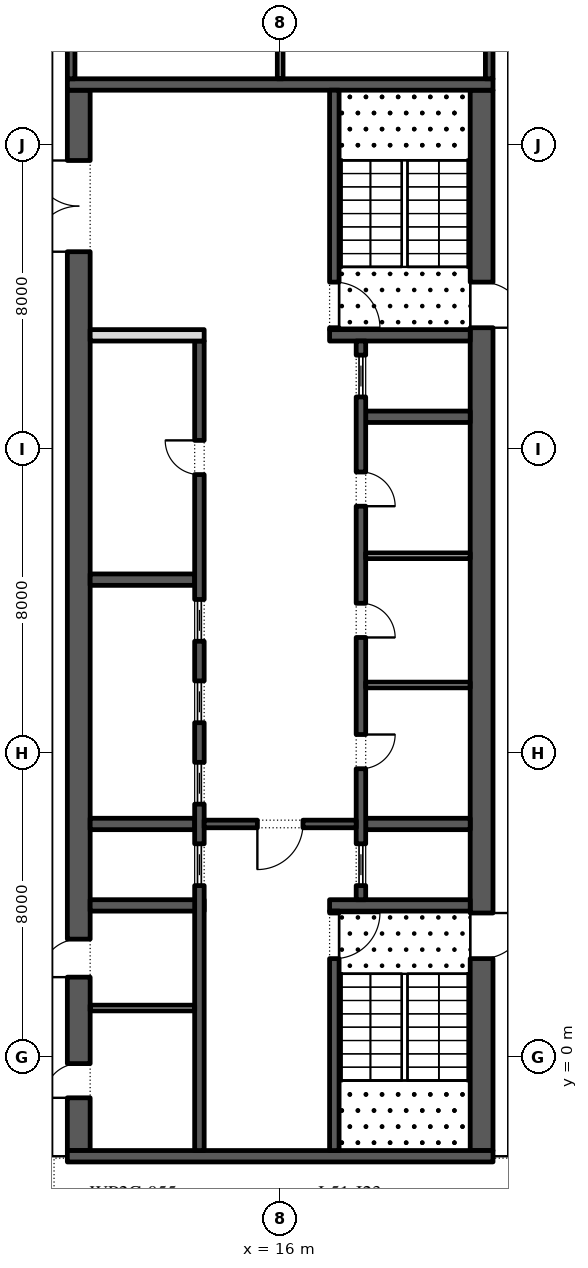
"""IFC4 building model, lengths in metres.
Left out: names, types, materials, properties, quantities, classifications, styles, units other than length and angle.
Written with IfcOpenShell. Run it as: python <this file> out.ifc"""

import sys

from ifc_helpers import new_model, si_unit, direction, frame, frame_2d, origin, place, context, subcontext, project, spatial, rectangle, extrude, element, fill, save


model = new_model("IFC4")
c1 = context("Model", 3, precision=1e-05, world=origin(), true_north=direction((0.0, 1.0)))
c2 = subcontext(c1, "Body", "Model", "MODEL_VIEW")
j1 = project(units=[si_unit("LENGTHUNIT", "METRE"), si_unit("PLANEANGLEUNIT", "RADIAN")], contexts=[c1])
p1 = place(None, origin())
s1 = spatial("IfcSite", under=j1, at=p1, CompositionType="ELEMENT")
p2 = place(p1, origin())
s2 = spatial("IfcBuilding", under=s1, at=p2, CompositionType="ELEMENT")
p3 = place(p2, frame((0.0, 0.0, 237.0)))
s3 = spatial("IfcBuildingStorey", under=s2, at=p3, CompositionType="ELEMENT", Elevation=237.0)
p4 = place(p3, frame((21.3, -2.45, 0.0), z_axis=(0.0, 0.0, 1.0), x_axis=(0.0, 1.0, 0.0)))
e1 = element("IfcWall", 1, at=p4, inside=s3, PredefinedType="SHEAR", context=c2, shape_type="SweptSolid", body=[
    extrude(rectangle(XDim=27.9, YDim=0.6, at=frame_2d((13.95, 0.0))), origin(), (0.0, 0.0, 1.0), 5.8),
])
p5 = place(p4, frame((5.05, 0.0, 0.0)))
e2 = element("IfcOpeningElement", 2, at=p5, cuts=e1, PredefinedType="OPENING", context=c2, shape_type="SweptSolid", body=[
    extrude(rectangle(XDim=1.2, YDim=2.1, at=frame_2d((0.6, 1.05))), frame((0.0, 0.31, 0.0), z_axis=(0.0, -1.0, 0.0), x_axis=(1.0, 0.0, 0.0)), (0.0, 0.0, 1.0), 0.62),
])
p6 = place(p4, frame((21.65, 0.0, 0.0)))
e3 = element("IfcOpeningElement", 3, at=p6, cuts=e1, PredefinedType="OPENING", context=c2, shape_type="SweptSolid", body=[
    extrude(rectangle(XDim=1.2, YDim=2.1, at=frame_2d((0.6, 1.05))), frame((0.0, 0.31, 0.0), z_axis=(0.0, -1.0, 0.0), x_axis=(1.0, 0.0, 0.0)), (0.0, 0.0, 1.0), 0.62),
])
p7 = place(p3, frame((10.7, -2.45, 0.0), z_axis=(0.0, 0.0, 1.0), x_axis=(0.0, 1.0, 0.0)))
e4 = element("IfcWall", 4, at=p7, inside=s3, PredefinedType="SHEAR", context=c2, shape_type="SweptSolid", body=[
    extrude(rectangle(XDim=27.9, YDim=0.6, at=frame_2d((13.95, 0.0))), origin(), (0.0, 0.0, 1.0), 5.8),
])
p8 = place(p7, frame((23.65, 0.0, 0.0)))
e5 = element("IfcOpeningElement", 5, at=p8, cuts=e4, PredefinedType="OPENING", context=c2, shape_type="SweptSolid", body=[
    extrude(rectangle(XDim=2.4, YDim=2.1, at=frame_2d((1.2, 1.05))), frame((0.0, 0.31, 0.0), z_axis=(0.0, -1.0, 0.0), x_axis=(1.0, 0.0, 0.0)), (0.0, 0.0, 1.0), 0.62),
])
p9 = place(p7, frame((1.387, 0.0, 0.0)))
e6 = element("IfcOpeningElement", 6, at=p9, cuts=e4, PredefinedType="OPENING", context=c2, shape_type="SweptSolid", body=[
    extrude(rectangle(XDim=0.9, YDim=2.1, at=frame_2d((0.45, 1.05))), frame((0.0, 0.31, 0.0), z_axis=(0.0, -1.0, 0.0), x_axis=(1.0, 0.0, 0.0)), (0.0, 0.0, 1.0), 0.62),
])
p10 = place(p7, frame((4.562, 0.0, 0.0)))
e7 = element("IfcOpeningElement", 7, at=p10, cuts=e4, PredefinedType="OPENING", context=c2, shape_type="SweptSolid", body=[
    extrude(rectangle(XDim=1.0, YDim=2.1, at=frame_2d((0.5, 1.05))), frame((0.0, 0.31, 0.0), z_axis=(0.0, -1.0, 0.0), x_axis=(1.0, 0.0, 0.0)), (0.0, 0.0, 1.0), 0.62),
])
for number, where, z_axis, x_axis in (
    (8, (10.4, -2.6, 0.0), (0.0, 0.0, 1.0), (1.0, 0.0, 0.0)),
    (9, (10.4, 25.6, 0.0), (0.0, 0.0, 1.0), (1.0, 0.0, 0.0)),
):
    element("IfcWall", number, at=place(p3, frame(where, z_axis=z_axis, x_axis=x_axis)), inside=s3, PredefinedType="SHEAR", context=c2, shape_type="SweptSolid", body=[
        extrude(rectangle(XDim=11.2, YDim=0.3, at=frame_2d((5.6, 0.0))), origin(), (0.0, 0.0, 1.0), 5.8),
    ])
p11 = place(p3, frame((17.3, 4.0, 0.0), z_axis=(0.0, 0.0, 1.0), x_axis=(1.0, 0.0, 0.0)))
e10 = element("IfcWall", 10, at=p11, inside=s3, PredefinedType="SHEAR", context=c2, shape_type="SweptSolid", body=[
    extrude(rectangle(XDim=3.7, YDim=0.3, at=frame_2d((1.85, 0.0))), origin(), (0.0, 0.0, 1.0), 5.8),
])
p12 = place(p3, frame((17.425, -2.45, 0.0), z_axis=(0.0, 0.0, 1.0), x_axis=(0.0, 1.0, 0.0)))
e11 = element("IfcWall", 11, at=p12, inside=s3, PredefinedType="SHEAR", context=c2, shape_type="SweptSolid", body=[
    extrude(rectangle(XDim=6.3, YDim=0.25, at=frame_2d((3.15, 0.0))), origin(), (0.0, 0.0, 1.0), 5.8),
])
p13 = place(p12, frame((5.05, 0.0, 0.0)))
e12 = element("IfcOpeningElement", 12, at=p13, cuts=e11, PredefinedType="OPENING", context=c2, shape_type="SweptSolid", body=[
    extrude(rectangle(XDim=1.2, YDim=2.1, at=frame_2d((0.6, 1.05))), frame((0.0, 0.135, 0.0), z_axis=(0.0, -1.0, 0.0), x_axis=(1.0, 0.0, 0.0)), (0.0, 0.0, 1.0), 0.27),
])
p14 = place(p3, frame((17.3, 19.0, 0.0), z_axis=(0.0, 0.0, 1.0), x_axis=(1.0, 0.0, 0.0)))
e13 = element("IfcWall", 13, at=p14, inside=s3, PredefinedType="SHEAR", context=c2, shape_type="SweptSolid", body=[
    extrude(rectangle(XDim=3.7, YDim=0.3, at=frame_2d((1.85, 0.0))), origin(), (0.0, 0.0, 1.0), 5.8),
])
p15 = place(p3, frame((17.425, 19.15, 0.0), z_axis=(0.0, 0.0, 1.0), x_axis=(0.0, 1.0, 0.0)))
e14 = element("IfcWall", 14, at=p15, inside=s3, PredefinedType="SHEAR", context=c2, shape_type="SweptSolid", body=[
    extrude(rectangle(XDim=6.3, YDim=0.25, at=frame_2d((3.15, 0.0))), origin(), (0.0, 0.0, 1.0), 5.8),
])
p16 = place(p15, frame((0.05, 0.0, 0.0)))
e15 = element("IfcOpeningElement", 15, at=p16, cuts=e14, PredefinedType="OPENING", context=c2, shape_type="SweptSolid", body=[
    extrude(rectangle(XDim=1.2, YDim=2.1, at=frame_2d((0.6, 1.05))), frame((0.0, 0.135, 0.0), z_axis=(0.0, -1.0, 0.0), x_axis=(1.0, 0.0, 0.0)), (0.0, 0.0, 1.0), 0.27),
])
for number, where, z_axis, x_axis in (
    (16, (18.25, 6.143, 0.0), (0.0, 0.0, 1.0), (1.0, 0.0, 0.0)),
    (17, (18.25, 16.857, 0.0), (0.0, 0.0, 1.0), (1.0, 0.0, 0.0)),
):
    element("IfcWall", number, at=place(p3, frame(where, z_axis=z_axis, x_axis=x_axis)), inside=s3, PredefinedType="SHEAR", context=c2, shape_type="SweptSolid", body=[
        extrude(rectangle(XDim=2.75, YDim=0.3, at=frame_2d((1.375, 0.0))), origin(), (0.0, 0.0, 1.0), 5.8),
    ])
p17 = place(p3, frame((18.125, 4.15, 0.0), z_axis=(0.0, 0.0, 1.0), x_axis=(0.0, 1.0, 0.0)))
e18 = element("IfcWall", 18, at=p17, inside=s3, PredefinedType="SHEAR", context=c2, shape_type="SweptSolid", body=[
    extrude(rectangle(XDim=14.7, YDim=0.25, at=frame_2d((7.35, 0.0))), origin(), (0.0, 0.0, 1.0), 5.8),
])
p18 = place(p17, frame((3.446, 0.0, 0.0)))
e19 = element("IfcOpeningElement", 19, at=p18, cuts=e18, PredefinedType="OPENING", context=c2, shape_type="SweptSolid", body=[
    extrude(rectangle(XDim=0.9, YDim=2.1, at=frame_2d((0.45, 1.05))), frame((0.0, 0.135, 0.0), z_axis=(0.0, -1.0, 0.0), x_axis=(1.0, 0.0, 0.0)), (0.0, 0.0, 1.0), 0.27),
])
p19 = place(p17, frame((6.9, 0.0, 0.0)))
e20 = element("IfcOpeningElement", 20, at=p19, cuts=e18, PredefinedType="OPENING", context=c2, shape_type="SweptSolid", body=[
    extrude(rectangle(XDim=0.9, YDim=2.1, at=frame_2d((0.45, 1.05))), frame((0.0, 0.135, 0.0), z_axis=(0.0, -1.0, 0.0), x_axis=(1.0, 0.0, 0.0)), (0.0, 0.0, 1.0), 0.27),
])
p20 = place(p17, frame((10.354, 0.0, 0.0)))
e21 = element("IfcOpeningElement", 21, at=p20, cuts=e18, PredefinedType="OPENING", context=c2, shape_type="SweptSolid", body=[
    extrude(rectangle(XDim=0.9, YDim=2.1, at=frame_2d((0.45, 1.05))), frame((0.0, 0.135, 0.0), z_axis=(0.0, -1.0, 0.0), x_axis=(1.0, 0.0, 0.0)), (0.0, 0.0, 1.0), 0.27),
])
p21 = place(p17, frame((0.371, 0.0, 0.0)))
e22 = element("IfcOpeningElement", 22, at=p21, cuts=e18, PredefinedType="OPENING", context=c2, shape_type="SweptSolid", body=[
    extrude(rectangle(XDim=1.1, YDim=2.1, at=frame_2d((0.55, 1.05))), frame((0.0, 0.135, 0.0), z_axis=(0.0, -1.0, 0.0), x_axis=(1.0, 0.0, 0.0)), (0.0, 0.0, 1.0), 0.27),
])
p22 = place(p17, frame((13.229, 0.0, 0.0)))
e23 = element("IfcOpeningElement", 23, at=p22, cuts=e18, PredefinedType="OPENING", context=c2, shape_type="SweptSolid", body=[
    extrude(rectangle(XDim=1.1, YDim=2.1, at=frame_2d((0.55, 1.05))), frame((0.0, 0.135, 0.0), z_axis=(0.0, -1.0, 0.0), x_axis=(1.0, 0.0, 0.0)), (0.0, 0.0, 1.0), 0.27),
])
for number, where, z_axis, x_axis in (
    (24, (18.25, 9.8, 0.0), (0.0, 0.0, 1.0), (1.0, 0.0, 0.0)),
    (25, (18.25, 13.2, 0.0), (0.0, 0.0, 1.0), (1.0, 0.0, 0.0)),
):
    element("IfcWall", number, at=place(p3, frame(where, z_axis=z_axis, x_axis=x_axis)), inside=s3, PredefinedType="PARTITIONING", context=c2, shape_type="SweptSolid", body=[
        extrude(rectangle(XDim=2.75, YDim=0.15, at=frame_2d((1.375, 0.0))), origin(), (0.0, 0.0, 1.0), 5.8),
    ])
p23 = place(p3, frame((11.0, 4.0, 0.0), z_axis=(0.0, 0.0, 1.0), x_axis=(1.0, 0.0, 0.0)))
e26 = element("IfcWall", 26, at=p23, inside=s3, PredefinedType="SHEAR", context=c2, shape_type="SweptSolid", body=[
    extrude(rectangle(XDim=3.0, YDim=0.3, at=frame_2d((1.5, 0.0))), origin(), (0.0, 0.0, 1.0), 5.8),
])
for number, where, z_axis, x_axis in (
    (27, (11.0, 6.143, 0.0), (0.0, 0.0, 1.0), (1.0, 0.0, 0.0)),
    (28, (11.0, 12.571, 0.0), (0.0, 0.0, 1.0), (1.0, 0.0, 0.0)),
):
    element("IfcWall", number, at=place(p3, frame(where, z_axis=z_axis, x_axis=x_axis)), inside=s3, PredefinedType="SHEAR", context=c2, shape_type="SweptSolid", body=[
        extrude(rectangle(XDim=2.75, YDim=0.3, at=frame_2d((1.375, 0.0))), origin(), (0.0, 0.0, 1.0), 5.8),
    ])
p24 = place(p3, frame((13.875, -2.45, 0.0), z_axis=(0.0, 0.0, 1.0), x_axis=(0.0, 1.0, 0.0)))
e29 = element("IfcWall", 29, at=p24, inside=s3, PredefinedType="SHEAR", context=c2, shape_type="SweptSolid", body=[
    extrude(rectangle(XDim=21.3, YDim=0.25, at=frame_2d((10.65, 0.0))), origin(), (0.0, 0.0, 1.0), 5.8),
])
p25 = place(p24, frame((17.786, 0.0, 0.0)))
e30 = element("IfcOpeningElement", 30, at=p25, cuts=e29, PredefinedType="OPENING", context=c2, shape_type="SweptSolid", body=[
    extrude(rectangle(XDim=0.9, YDim=2.1, at=frame_2d((0.45, 1.05))), frame((0.0, 0.135, 0.0), z_axis=(0.0, -1.0, 0.0), x_axis=(1.0, 0.0, 0.0)), (0.0, 0.0, 1.0), 0.27),
])
p26 = place(p24, frame((6.971, 0.0, 0.0)))
e31 = element("IfcOpeningElement", 31, at=p26, cuts=e29, PredefinedType="OPENING", context=c2, shape_type="SweptSolid", body=[
    extrude(rectangle(XDim=1.1, YDim=2.1, at=frame_2d((0.55, 1.05))), frame((0.0, 0.135, 0.0), z_axis=(0.0, -1.0, 0.0), x_axis=(1.0, 0.0, 0.0)), (0.0, 0.0, 1.0), 0.27),
])
p27 = place(p24, frame((9.114, 0.0, 0.0)))
e32 = element("IfcOpeningElement", 32, at=p27, cuts=e29, PredefinedType="OPENING", context=c2, shape_type="SweptSolid", body=[
    extrude(rectangle(XDim=1.1, YDim=2.1, at=frame_2d((0.55, 1.05))), frame((0.0, 0.135, 0.0), z_axis=(0.0, -1.0, 0.0), x_axis=(1.0, 0.0, 0.0)), (0.0, 0.0, 1.0), 0.27),
])
p28 = place(p24, frame((11.257, 0.0, 0.0)))
e33 = element("IfcOpeningElement", 33, at=p28, cuts=e29, PredefinedType="OPENING", context=c2, shape_type="SweptSolid", body=[
    extrude(rectangle(XDim=1.1, YDim=2.1, at=frame_2d((0.55, 1.05))), frame((0.0, 0.135, 0.0), z_axis=(0.0, -1.0, 0.0), x_axis=(1.0, 0.0, 0.0)), (0.0, 0.0, 1.0), 0.27),
])
p29 = place(p24, frame((13.4, 0.0, 0.0)))
e34 = element("IfcOpeningElement", 34, at=p29, cuts=e29, PredefinedType="OPENING", context=c2, shape_type="SweptSolid", body=[
    extrude(rectangle(XDim=1.1, YDim=2.1, at=frame_2d((0.55, 1.05))), frame((0.0, 0.135, 0.0), z_axis=(0.0, -1.0, 0.0), x_axis=(1.0, 0.0, 0.0)), (0.0, 0.0, 1.0), 0.27),
])
p30 = place(p3, frame((11.0, 19.0, 0.0), z_axis=(0.0, 0.0, 1.0), x_axis=(1.0, 0.0, 0.0)))
e35 = element("IfcWall", 35, at=p30, inside=s3, PredefinedType="PARTITIONING", context=c2, shape_type="SweptSolid", body=[
    extrude(rectangle(XDim=3.0, YDim=0.3, at=frame_2d((1.5, 0.0))), origin(), (0.0, 0.0, 1.0), 5.8),
])
p31 = place(p3, frame((14.0, 6.143, 0.0), z_axis=(0.0, 0.0, 1.0), x_axis=(1.0, 0.0, 0.0)))
e36 = element("IfcWall", 36, at=p31, inside=s3, PredefinedType="SHEAR", context=c2, shape_type="SweptSolid", body=[
    extrude(rectangle(XDim=4.0, YDim=0.2, at=frame_2d((2.0, 0.0))), origin(), (0.0, 0.0, 1.0), 5.8),
])
p32 = place(p31, frame((1.4, 0.0, 0.0)))
e37 = element("IfcOpeningElement", 37, at=p32, cuts=e36, PredefinedType="OPENING", context=c2, shape_type="SweptSolid", body=[
    extrude(rectangle(XDim=1.2, YDim=2.1, at=frame_2d((0.6, 1.05))), frame((0.0, 0.11, 0.0), z_axis=(0.0, -1.0, 0.0), x_axis=(1.0, 0.0, 0.0)), (0.0, 0.0, 1.0), 0.22),
])
p33 = place(p3, frame((11.0, 1.3, 0.0), z_axis=(0.0, 0.0, 1.0), x_axis=(1.0, 0.0, 0.0)))
e38 = element("IfcWall", 38, at=p33, inside=s3, PredefinedType="PARTITIONING", context=c2, shape_type="SweptSolid", body=[
    extrude(rectangle(XDim=2.75, YDim=0.15, at=frame_2d((1.375, 0.0))), origin(), (0.0, 0.0, 1.0), 5.8),
])
p34 = place(p3, frame((21.5, 25.75, 0.0), z_axis=(0.0, 0.0, 1.0), x_axis=(0.0, 1.0, 0.0)))
e39 = element("IfcWall", 39, at=p34, inside=s3, PredefinedType="SHEAR", context=c2, shape_type="SweptSolid", body=[
    extrude(rectangle(XDim=4.75, YDim=0.2, at=frame_2d((2.375, 0.0))), origin(), (0.0, 0.0, 1.0), 5.8),
])
p35 = place(p34, frame((1.925, 0.0, 0.0)))
e40 = element("IfcOpeningElement", 40, at=p35, cuts=e39, PredefinedType="OPENING", context=c2, shape_type="SweptSolid", body=[
    extrude(rectangle(XDim=0.9, YDim=2.1, at=frame_2d((0.45, 1.05))), frame((0.0, 0.11, 0.0), z_axis=(0.0, -1.0, 0.0), x_axis=(1.0, 0.0, 0.0)), (0.0, 0.0, 1.0), 0.22),
])
p36 = place(p3, frame((10.5, 25.75, 0.0), z_axis=(0.0, 0.0, 1.0), x_axis=(0.0, 1.0, 0.0)))
e41 = element("IfcWall", 41, at=p36, inside=s3, PredefinedType="SHEAR", context=c2, shape_type="SweptSolid", body=[
    extrude(rectangle(XDim=4.75, YDim=0.2, at=frame_2d((2.375, 0.0))), origin(), (0.0, 0.0, 1.0), 5.8),
])
p37 = place(p36, frame((1.925, 0.0, 0.0)))
e42 = element("IfcOpeningElement", 42, at=p37, cuts=e41, PredefinedType="OPENING", context=c2, shape_type="SweptSolid", body=[
    extrude(rectangle(XDim=0.9, YDim=2.1, at=frame_2d((0.45, 1.05))), frame((0.0, 0.11, 0.0), z_axis=(0.0, -1.0, 0.0), x_axis=(1.0, 0.0, 0.0)), (0.0, 0.0, 1.0), 0.22),
])
p38 = place(p3, frame((16.0, 25.75, 0.0), z_axis=(0.0, 0.0, 1.0), x_axis=(0.0, 1.0, 0.0)))
e43 = element("IfcWall", 43, at=p38, inside=s3, PredefinedType="PARTITIONING", context=c2, shape_type="SweptSolid", body=[
    extrude(rectangle(XDim=4.75, YDim=0.15, at=frame_2d((2.375, 0.0))), origin(), (0.0, 0.0, 1.0), 5.8),
])
p39 = place(p18, frame((0.9, -0.2, 0.0), z_axis=(0.0, 0.0, 1.0), x_axis=(-1.0, 0.0, 0.0)))
e44 = element("IfcDoor", 44, at=p39, inside=s3, OperationType="SINGLE_SWING_RIGHT", PredefinedType="DOOR", context=c2, shape_type="SweptSolid", body=[
    extrude(rectangle(XDim=0.9, YDim=2.1, at=frame_2d((0.45, 1.05))), frame((0.0, -0.075, 0.0), z_axis=(0.0, -1.0, 0.0), x_axis=(1.0, 0.0, 0.0)), (0.0, 0.0, 1.0), 0.05),
])
fill(e19, e44)
p40 = place(p19, frame((0.9, -0.2, 0.0), z_axis=(0.0, 0.0, 1.0), x_axis=(-1.0, 0.0, 0.0)))
e45 = element("IfcDoor", 45, at=p40, inside=s3, OperationType="SINGLE_SWING_LEFT", PredefinedType="DOOR", context=c2, shape_type="SweptSolid", body=[
    extrude(rectangle(XDim=0.9, YDim=2.1, at=frame_2d((0.45, 1.05))), frame((0.0, -0.075, 0.0), z_axis=(0.0, -1.0, 0.0), x_axis=(1.0, 0.0, 0.0)), (0.0, 0.0, 1.0), 0.05),
])
fill(e20, e45)
p41 = place(p20, frame((0.9, -0.2, 0.0), z_axis=(0.0, 0.0, 1.0), x_axis=(-1.0, 0.0, 0.0)))
e46 = element("IfcDoor", 46, at=p41, inside=s3, OperationType="SINGLE_SWING_LEFT", PredefinedType="DOOR", context=c2, shape_type="SweptSolid", body=[
    extrude(rectangle(XDim=0.9, YDim=2.1, at=frame_2d((0.45, 1.05))), frame((0.0, -0.075, 0.0), z_axis=(0.0, -1.0, 0.0), x_axis=(1.0, 0.0, 0.0)), (0.0, 0.0, 1.0), 0.05),
])
fill(e21, e46)
p42 = place(p21, origin())
e47 = element("IfcDoor", 47, at=p42, inside=s3, OperationType="SLIDING_TO_LEFT", PredefinedType="DOOR", context=c2, shape_type="SweptSolid", body=[
    extrude(rectangle(XDim=1.1, YDim=2.1, at=frame_2d((0.55, 1.05))), frame((0.0, 0.025, 0.0), z_axis=(0.0, -1.0, 0.0), x_axis=(1.0, 0.0, 0.0)), (0.0, 0.0, 1.0), 0.05),
])
fill(e22, e47)
p43 = place(p22, origin())
e48 = element("IfcDoor", 48, at=p43, inside=s3, OperationType="SLIDING_TO_LEFT", PredefinedType="DOOR", context=c2, shape_type="SweptSolid", body=[
    extrude(rectangle(XDim=1.1, YDim=2.1, at=frame_2d((0.55, 1.05))), frame((0.0, 0.025, 0.0), z_axis=(0.0, -1.0, 0.0), x_axis=(1.0, 0.0, 0.0)), (0.0, 0.0, 1.0), 0.05),
])
fill(e23, e48)
p44 = place(p25, origin())
e49 = element("IfcDoor", 49, at=p44, inside=s3, OperationType="SINGLE_SWING_LEFT", PredefinedType="DOOR", context=c2, shape_type="SweptSolid", body=[
    extrude(rectangle(XDim=0.9, YDim=2.1, at=frame_2d((0.45, 1.05))), frame((0.0, 0.125, 0.0), z_axis=(0.0, -1.0, 0.0), x_axis=(1.0, 0.0, 0.0)), (0.0, 0.0, 1.0), 0.05),
])
fill(e30, e49)
p45 = place(p26, origin())
e50 = element("IfcDoor", 50, at=p45, inside=s3, OperationType="SLIDING_TO_LEFT", PredefinedType="DOOR", context=c2, shape_type="SweptSolid", body=[
    extrude(rectangle(XDim=1.1, YDim=2.1, at=frame_2d((0.55, 1.05))), frame((0.0, 0.025, 0.0), z_axis=(0.0, -1.0, 0.0), x_axis=(1.0, 0.0, 0.0)), (0.0, 0.0, 1.0), 0.05),
])
fill(e31, e50)
p46 = place(p27, origin())
e51 = element("IfcDoor", 51, at=p46, inside=s3, OperationType="SLIDING_TO_LEFT", PredefinedType="DOOR", context=c2, shape_type="SweptSolid", body=[
    extrude(rectangle(XDim=1.1, YDim=2.1, at=frame_2d((0.55, 1.05))), frame((0.0, 0.025, 0.0), z_axis=(0.0, -1.0, 0.0), x_axis=(1.0, 0.0, 0.0)), (0.0, 0.0, 1.0), 0.05),
])
fill(e32, e51)
p47 = place(p28, origin())
e52 = element("IfcDoor", 52, at=p47, inside=s3, OperationType="SLIDING_TO_LEFT", PredefinedType="DOOR", context=c2, shape_type="SweptSolid", body=[
    extrude(rectangle(XDim=1.1, YDim=2.1, at=frame_2d((0.55, 1.05))), frame((0.0, 0.025, 0.0), z_axis=(0.0, -1.0, 0.0), x_axis=(1.0, 0.0, 0.0)), (0.0, 0.0, 1.0), 0.05),
])
fill(e33, e52)
p48 = place(p29, origin())
e53 = element("IfcDoor", 53, at=p48, inside=s3, OperationType="SLIDING_TO_LEFT", PredefinedType="DOOR", context=c2, shape_type="SweptSolid", body=[
    extrude(rectangle(XDim=1.1, YDim=2.1, at=frame_2d((0.55, 1.05))), frame((0.0, 0.025, 0.0), z_axis=(0.0, -1.0, 0.0), x_axis=(1.0, 0.0, 0.0)), (0.0, 0.0, 1.0), 0.05),
])
fill(e34, e53)
p49 = place(p32, frame((1.2, 0.0, 0.0), z_axis=(0.0, 0.0, 1.0), x_axis=(-1.0, 0.0, 0.0)))
e54 = element("IfcDoor", 54, at=p49, inside=s3, OperationType="SINGLE_SWING_LEFT", PredefinedType="DOOR", context=c2, shape_type="SweptSolid", body=[
    extrude(rectangle(XDim=1.2, YDim=2.1, at=frame_2d((0.6, 1.05))), frame((0.0, 0.025, 0.0), z_axis=(0.0, -1.0, 0.0), x_axis=(1.0, 0.0, 0.0)), (0.0, 0.0, 1.0), 0.05),
])
fill(e37, e54)
p50 = place(p8, origin())
e55 = element("IfcDoor", 55, at=p50, inside=s3, OperationType="DOUBLE_DOOR_SINGLE_SWING", PredefinedType="DOOR", context=c2, shape_type="SweptSolid", body=[
    extrude(rectangle(XDim=2.4, YDim=2.1, at=frame_2d((1.2, 1.05))), frame((0.0, 0.025, 0.0), z_axis=(0.0, -1.0, 0.0), x_axis=(1.0, 0.0, 0.0)), (0.0, 0.0, 1.0), 0.05),
])
fill(e5, e55)
p51 = place(p13, frame((1.2, 0.0, 0.0), z_axis=(0.0, 0.0, 1.0), x_axis=(-1.0, 0.0, 0.0)))
e56 = element("IfcDoor", 56, at=p51, inside=s3, OperationType="SINGLE_SWING_RIGHT", PredefinedType="DOOR", context=c2, shape_type="SweptSolid", body=[
    extrude(rectangle(XDim=1.2, YDim=2.1, at=frame_2d((0.6, 1.05))), frame((0.0, 0.025, 0.0), z_axis=(0.0, -1.0, 0.0), x_axis=(1.0, 0.0, 0.0)), (0.0, 0.0, 1.0), 0.05),
])
fill(e12, e56)
p52 = place(p5, frame((1.2, 0.0, 0.0), z_axis=(0.0, 0.0, 1.0), x_axis=(-1.0, 0.0, 0.0)))
e57 = element("IfcDoor", 57, at=p52, inside=s3, OperationType="SINGLE_SWING_RIGHT", PredefinedType="DOOR", context=c2, shape_type="SweptSolid", body=[
    extrude(rectangle(XDim=1.2, YDim=2.1, at=frame_2d((0.6, 1.05))), frame((0.0, 0.025, 0.0), z_axis=(0.0, -1.0, 0.0), x_axis=(1.0, 0.0, 0.0)), (0.0, 0.0, 1.0), 0.05),
])
fill(e2, e57)
p53 = place(p16, frame((1.2, 0.0, 0.0), z_axis=(0.0, 0.0, 1.0), x_axis=(-1.0, 0.0, 0.0)))
e58 = element("IfcDoor", 58, at=p53, inside=s3, OperationType="SINGLE_SWING_LEFT", PredefinedType="DOOR", context=c2, shape_type="SweptSolid", body=[
    extrude(rectangle(XDim=1.2, YDim=2.1, at=frame_2d((0.6, 1.05))), frame((0.0, 0.025, 0.0), z_axis=(0.0, -1.0, 0.0), x_axis=(1.0, 0.0, 0.0)), (0.0, 0.0, 1.0), 0.05),
])
fill(e15, e58)
p54 = place(p6, frame((1.2, 0.0, 0.0), z_axis=(0.0, 0.0, 1.0), x_axis=(-1.0, 0.0, 0.0)))
e59 = element("IfcDoor", 59, at=p54, inside=s3, OperationType="SINGLE_SWING_LEFT", PredefinedType="DOOR", context=c2, shape_type="SweptSolid", body=[
    extrude(rectangle(XDim=1.2, YDim=2.1, at=frame_2d((0.6, 1.05))), frame((0.0, 0.025, 0.0), z_axis=(0.0, -1.0, 0.0), x_axis=(1.0, 0.0, 0.0)), (0.0, 0.0, 1.0), 0.05),
])
fill(e3, e59)
p55 = place(p9, origin())
e60 = element("IfcDoor", 60, at=p55, inside=s3, OperationType="SINGLE_SWING_RIGHT", PredefinedType="DOOR", context=c2, shape_type="SweptSolid", body=[
    extrude(rectangle(XDim=0.9, YDim=2.1, at=frame_2d((0.45, 1.05))), frame((0.0, -0.25, 0.0), z_axis=(0.0, -1.0, 0.0), x_axis=(1.0, 0.0, 0.0)), (0.0, 0.0, 1.0), 0.05),
])
fill(e6, e60)
p56 = place(p10, origin())
e61 = element("IfcDoor", 61, at=p56, inside=s3, OperationType="SINGLE_SWING_RIGHT", PredefinedType="DOOR", context=c2, shape_type="SweptSolid", body=[
    extrude(rectangle(XDim=1.0, YDim=2.1, at=frame_2d((0.5, 1.05))), frame((0.0, -0.25, 0.0), z_axis=(0.0, -1.0, 0.0), x_axis=(1.0, 0.0, 0.0)), (0.0, 0.0, 1.0), 0.05),
])
fill(e7, e61)
save(model, sys.argv[1])
